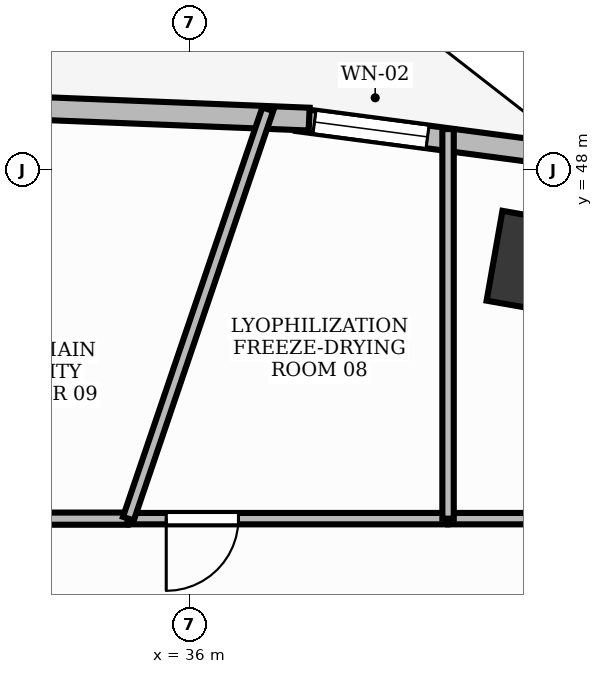
"""IFC4 building model, lengths in metres.
Left out: names, types, materials, properties, quantities, classifications, styles, units other than length and angle.
Written with IfcOpenShell. Run it as: python <this file> out.ifc"""

import sys

from ifc_helpers import new_model, si_unit, direction, frame, frame_2d, origin, origin_2d, place, context, subcontext, project, spatial, rectangle, extrude, element, fill, save


model = new_model("IFC4")
c1 = context("Model", 3, precision=1e-05, world=origin(), true_north=direction((0.0, 1.0)))
c2 = subcontext(c1, "Body", "Model", "MODEL_VIEW")
j1 = project(units=[si_unit("LENGTHUNIT", "METRE"), si_unit("PLANEANGLEUNIT", "RADIAN")], contexts=[c1])
p1 = place(None, origin())
s1 = spatial("IfcSite", under=j1, at=p1, CompositionType="ELEMENT")
p2 = place(p1, origin())
s2 = spatial("IfcBuilding", under=s1, at=p2, CompositionType="ELEMENT")
p3 = place(p2, frame((0.0, 0.0, 98.4)))
s3 = spatial("IfcBuildingStorey", under=s2, at=p3, CompositionType="ELEMENT", Elevation=98.4)
p4 = place(p3, frame((40.604, 46.765, -0.0), z_axis=(0.0, 0.0, 1.0), x_axis=(-0.984868307662, 0.173304404339, 0.0)))
e1 = element("IfcColumn", 1, at=p4, inside=s3, PredefinedType="COLUMN", context=c2, shape_type="SweptSolid", body=[
    extrude(rectangle(XDim=1.2, YDim=1.2, at=origin_2d()), origin(), (0.0, 0.0, 1.0), 3.901),
])
p5 = place(p3, frame((40.964, 48.19, 0.0), z_axis=(0.0, 0.0, 1.0), x_axis=(-0.991369257822, 0.131099178664, 0.0)))
e2 = element("IfcWall", 2, at=p5, inside=s3, PredefinedType="STANDARD", context=c2, shape_type="SweptSolid", body=[
    extrude(rectangle(XDim=3.575, YDim=0.3, at=frame_2d((1.788, 0.0))), origin(), (0.0, 0.0, 1.0), 3.9),
])
p6 = place(p5, frame((1.848, 0.0, 0.95)))
e3 = element("IfcOpeningElement", 3, at=p6, cuts=e2, PredefinedType="OPENING", context=c2, shape_type="SweptSolid", body=[
    extrude(rectangle(XDim=1.5, YDim=1.8, at=frame_2d((0.75, 0.9))), frame((0.0, 0.165, 0.0), z_axis=(0.0, -1.0, 0.0), x_axis=(1.0, 0.0, 0.0)), (0.0, 0.0, 1.0), 0.33),
])
p7 = place(p3, frame((37.574, 48.666, 0.0), z_axis=(0.0, 0.0, 1.0), x_axis=(-0.999212076676, 0.039689114679, 0.0)))
e4 = element("IfcWall", 4, at=p7, inside=s3, PredefinedType="STANDARD", context=c2, shape_type="SweptSolid", body=[
    extrude(rectangle(XDim=3.635, YDim=0.3, at=frame_2d((1.818, 0.0))), origin(), (0.0, 0.0, 1.0), 3.9),
])
p8 = place(p3, frame((44.2, 43.41, 0.0), z_axis=(0.0, 0.0, 1.0), x_axis=(-1.0, 0.0, 0.0)))
e5 = element("IfcWall", 5, at=p8, inside=s3, PredefinedType="PARTITIONING", context=c2, shape_type="SweptSolid", body=[
    extrude(rectangle(XDim=4.798, YDim=0.15, at=frame_2d((2.399, 0.0))), origin(), (0.0, 0.0, 1.0), 2.91),
])
p9 = place(p8, frame((0.24, 0.0, 0.0)))
e6 = element("IfcOpeningElement", 6, at=p9, cuts=e5, PredefinedType="OPENING", context=c2, shape_type="SweptSolid", body=[
    extrude(rectangle(XDim=0.95, YDim=2.15, at=frame_2d((0.475, 1.075))), frame((0.0, 0.09, 0.0), z_axis=(0.0, -1.0, 0.0), x_axis=(1.0, 0.0, 0.0)), (0.0, 0.0, 1.0), 0.18),
])
p10 = place(p3, frame((39.392, 43.41, 0.0), z_axis=(0.0, 0.0, 1.0), x_axis=(-1.0, 0.0, 0.0)))
e7 = element("IfcWall", 7, at=p10, inside=s3, PredefinedType="PARTITIONING", context=c2, shape_type="SweptSolid", body=[
    extrude(rectangle(XDim=4.196, YDim=0.15, at=frame_2d((2.098, 0.0))), origin(), (0.0, 0.0, 1.0), 2.91),
])
p11 = place(p10, frame((2.748, 0.0, 0.0)))
e8 = element("IfcOpeningElement", 8, at=p11, cuts=e7, PredefinedType="OPENING", context=c2, shape_type="SweptSolid", body=[
    extrude(rectangle(XDim=0.95, YDim=2.15, at=frame_2d((0.475, 1.075))), frame((0.0, 0.09, 0.0), z_axis=(0.0, -1.0, 0.0), x_axis=(1.0, 0.0, 0.0)), (0.0, 0.0, 1.0), 0.18),
])
p12 = place(p3, frame((35.186, 43.41, 0.0), z_axis=(0.0, 0.0, 1.0), x_axis=(-1.0, 0.0, 0.0)))
e9 = element("IfcWall", 9, at=p12, inside=s3, PredefinedType="PARTITIONING", context=c2, shape_type="SweptSolid", body=[
    extrude(rectangle(XDim=15.144, YDim=0.16, at=frame_2d((7.572, 0.0))), origin(), (0.0, 0.0, 1.0), 2.91),
])
p13 = place(p12, frame((7.387, 0.0, 0.0)))
e10 = element("IfcOpeningElement", 10, at=p13, cuts=e9, PredefinedType="OPENING", context=c2, shape_type="SweptSolid", body=[
    extrude(rectangle(XDim=0.95, YDim=2.15, at=frame_2d((0.475, 1.075))), frame((0.0, 0.095, 0.0), z_axis=(0.0, -1.0, 0.0), x_axis=(1.0, 0.0, 0.0)), (0.0, 0.0, 1.0), 0.19),
])
p14 = place(p3, frame((39.402, 43.41, 0.0), z_axis=(0.0, 0.0, 1.0), x_axis=(0.0, 1.0, 0.0)))
e11 = element("IfcWall", 11, at=p14, inside=s3, PredefinedType="PARTITIONING", context=c2, shape_type="SweptSolid", body=[
    extrude(rectangle(XDim=5.125, YDim=0.15, at=frame_2d((2.563, 0.0))), origin(), (0.0, 0.0, 1.0), 2.91),
])
p15 = place(p3, frame((35.196, 43.41, 0.0), z_axis=(0.0, 0.0, 1.0), x_axis=(0.322244983046, 0.946656310866, 0.0)))
e12 = element("IfcWall", 12, at=p15, inside=s3, PredefinedType="PARTITIONING", context=c2, shape_type="SweptSolid", body=[
    extrude(rectangle(XDim=5.69, YDim=0.15, at=frame_2d((2.845, 0.0))), origin(), (0.0, 0.0, 1.0), 2.91),
])
p16 = place(p6, origin())
e13 = element("IfcWindow", 13, at=p16, inside=s3, PartitioningType="DOUBLE_PANEL_VERTICAL", PredefinedType="WINDOW", context=c2, shape_type="SweptSolid", body=[
    extrude(rectangle(XDim=1.5, YDim=1.8, at=frame_2d((0.75, 0.9))), frame((0.0, 0.03, 0.0), z_axis=(0.0, -1.0, 0.0), x_axis=(1.0, 0.0, 0.0)), (0.0, 0.0, 1.0), 0.06),
])
fill(e3, e13)
p17 = place(p11, origin())
e14 = element("IfcDoor", 14, at=p17, inside=s3, OperationType="SINGLE_SWING_RIGHT", PredefinedType="DOOR", context=c2, shape_type="SweptSolid", body=[
    extrude(rectangle(XDim=0.95, YDim=2.15, at=frame_2d((0.475, 1.075))), frame((0.0, 0.025, 0.0), z_axis=(0.0, -1.0, 0.0), x_axis=(1.0, 0.0, 0.0)), (0.0, 0.0, 1.0), 0.05),
])
fill(e8, e14)
save(model, sys.argv[1])
